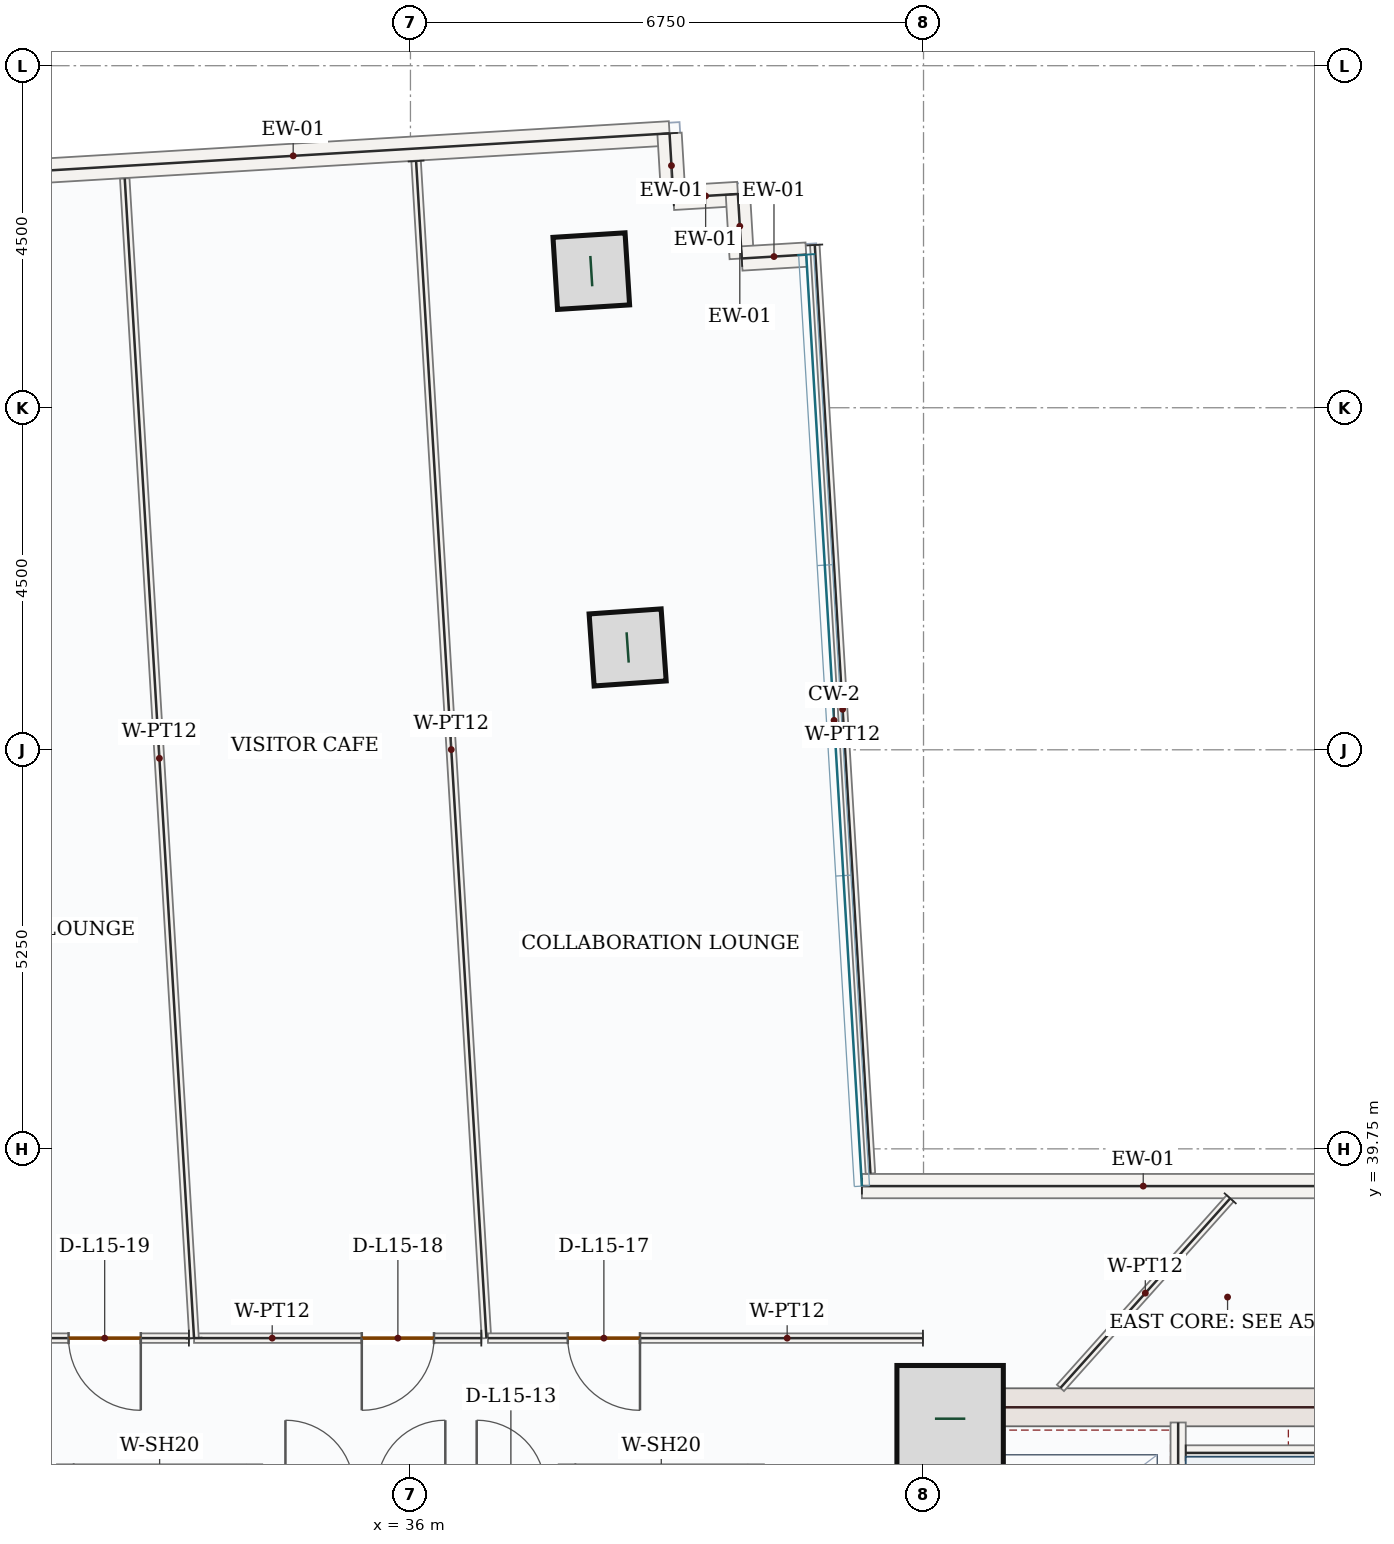
"""IFC4 building model, lengths in metres.
Left out: names, types, materials, properties, quantities, classifications, styles, units other than length and angle.
Written with IfcOpenShell. Run it as: python <this file> out.ifc"""

import sys

from ifc_helpers import new_model, si_unit, direction, frame, frame_2d, origin, origin_2d, place, context, subcontext, project, spatial, rectangle, hollow_rectangle, extrude, source, transform, mapped, element, fill, save


model = new_model("IFC4")
c1 = context("Model", 3, precision=1e-05, world=origin(), true_north=direction((0.0, 1.0)))
c2 = subcontext(c1, "Body", "Model", "MODEL_VIEW")
j1 = project(units=[si_unit("LENGTHUNIT", "METRE"), si_unit("PLANEANGLEUNIT", "RADIAN")], contexts=[c1])
p1 = place(None, origin())
s1 = spatial("IfcSite", under=j1, at=p1, CompositionType="ELEMENT")
p2 = place(p1, origin())
s2 = spatial("IfcBuilding", under=s1, at=p2, CompositionType="ELEMENT")
p3 = place(p2, frame((0.0, 0.0, 71.1)))
s3 = spatial("IfcBuildingStorey", under=s2, at=p3, CompositionType="ELEMENT", Elevation=71.1)
p4 = place(p3, frame((43.0, 28.05, 0.0), z_axis=(0.0, 0.0, 1.0), x_axis=(0.0, 1.0, 0.0)))
e1 = element("IfcWall", 1, at=p4, inside=s3, PredefinedType="SHEAR", context=c2, shape_type="SweptSolid", body=[
    extrude(rectangle(XDim=8.55, YDim=0.5, at=frame_2d((4.275, 0.0))), origin(), (0.0, 0.0, 1.0), 3.95),
])
p5 = place(p4, frame((1.5, 0.0, 0.0)))
e2 = element("IfcOpeningElement", 2, at=p5, cuts=e1, PredefinedType="OPENING", context=c2, shape_type="SweptSolid", body=[
    extrude(rectangle(XDim=1.1, YDim=2.2, at=frame_2d((0.55, 1.1))), frame((0.0, 0.26, 0.0), z_axis=(0.0, -1.0, 0.0), x_axis=(1.0, 0.0, 0.0)), (0.0, 0.0, 1.0), 0.52),
])
m1 = source(origin(), c2, "Body", "SweptSolid", [
    extrude(rectangle(XDim=7.0, YDim=0.5, at=frame_2d((3.5, 0.0))), origin(), (0.0, 0.0, 1.0), 3.95),
])
p6 = place(p3, frame((43.25, 36.35, 0.0), z_axis=(0.0, 0.0, 1.0), x_axis=(1.0, 0.0, 0.0)))
e3 = element("IfcWall", 3, at=p6, inside=s3, PredefinedType="SHEAR", context=c2, shape_type="MappedRepresentation", body=[
    mapped(m1, transform((0.0, 0.0, 0.0), x_axis=(1.0, 0.0, 0.0), y_axis=(0.0, 1.0, 0.0), z_axis=(0.0, 0.0, 1.0), scale=1.0)),
])
m2 = source(origin(), c2, "Body", "SweptSolid", [
    extrude(rectangle(XDim=1.4, YDim=1.4, at=origin_2d()), origin(), (0.0, 0.0, 1.0), 4.2),
])
p7 = place(p3, frame((43.1, 36.2, 0.0), z_axis=(0.0, 0.0, 1.0), x_axis=(1.0, 0.0, 0.0)))
e4 = element("IfcColumn", 4, at=p7, inside=s3, PredefinedType="COLUMN", context=c2, shape_type="MappedRepresentation", body=[
    mapped(m2, transform((0.0, 0.0, 0.0), x_axis=(1.0, 0.0, 0.0), y_axis=(0.0, 1.0, 0.0), z_axis=(0.0, 0.0, 1.0), scale=1.0)),
])
m3 = source(origin(), c2, "Body", "SweptSolid", [
    extrude(hollow_rectangle(XDim=0.95, YDim=0.95, WallThickness=0.05, at=origin_2d()), origin(), (0.0, 0.0, 1.0), 4.2),
])
for number, where, z_axis, x_axis in (
    (5, (38.857, 46.346, 0.0), (0.0, 0.0, 1.0), (-0.07, 0.998, 0.0)),
    (6, (38.379, 51.297, 0.0), (0.0, 0.0, 1.0), (-0.063, 0.998, 0.0)),
):
    element("IfcColumn", number, at=place(p3, frame(where, z_axis=z_axis, x_axis=x_axis)), inside=s3, PredefinedType="COLUMN", context=c2, shape_type="MappedRepresentation", body=[
        mapped(m3, transform((0.0, 0.0, 0.0), x_axis=(1.0, 0.0, 0.0), y_axis=(0.0, 1.0, 0.0), z_axis=(0.0, 0.0, 1.0), scale=1.0)),
    ])
m4 = source(origin(), c2, "Body", "SweptSolid", [
    extrude(rectangle(XDim=9.92, YDim=0.32, at=frame_2d((4.96, 0.0))), origin(), (0.0, 0.0, 1.0), 3.95),
])
p8 = place(p3, frame((29.506, 52.518, 0.0), z_axis=(0.0, 0.0, 1.0), x_axis=(0.998218942745, 0.059656871726, 0.0)))
e7 = element("IfcWall", 7, at=p8, inside=s3, PredefinedType="SOLIDWALL", context=c2, shape_type="MappedRepresentation", body=[
    mapped(m4, transform((0.0, 0.0, 0.0), x_axis=(1.0, 0.0, 0.0), y_axis=(0.0, 1.0, 0.0), z_axis=(0.0, 0.0, 1.0), scale=1.0)),
])
m5 = source(origin(), c2, "Body", "SweptSolid", [
    extrude(rectangle(XDim=0.85, YDim=0.32, at=frame_2d((0.425, 0.0))), origin(), (0.0, 0.0, 1.0), 3.95),
])
p9 = place(p3, frame((39.408, 53.11, 0.0), z_axis=(0.0, 0.0, 1.0), x_axis=(0.059732049764, -0.998214447016, 0.0)))
e8 = element("IfcWall", 8, at=p9, inside=s3, PredefinedType="SOLIDWALL", context=c2, shape_type="MappedRepresentation", body=[
    mapped(m5, transform((0.0, 0.0, 0.0), x_axis=(1.0, 0.0, 0.0), y_axis=(0.0, 1.0, 0.0), z_axis=(0.0, 0.0, 1.0), scale=1.0)),
])
m6 = source(origin(), c2, "Body", "SweptSolid", [
    extrude(rectangle(XDim=0.85, YDim=0.32, at=frame_2d((0.425, 0.0))), origin(), (0.0, 0.0, 1.0), 3.95),
])
for number, where, z_axis, x_axis in (
    (9, (39.459, 52.261, 0.0), (0.0, 0.0, 1.0), (0.998, 0.06, 0.0)),
    (10, (40.308, 52.312, 0.0), (0.0, 0.0, 1.0), (0.06, -0.998, 0.0)),
    (11, (40.358, 51.464, 0.0), (0.0, 0.0, 1.0), (0.998, 0.06, 0.0)),
):
    element("IfcWall", number, at=place(p3, frame(where, z_axis=z_axis, x_axis=x_axis)), inside=s3, PredefinedType="SOLIDWALL", context=c2, shape_type="MappedRepresentation", body=[
        mapped(m6, transform((0.0, 0.0, 0.0), x_axis=(1.0, 0.0, 0.0), y_axis=(0.0, 1.0, 0.0), z_axis=(0.0, 0.0, 1.0), scale=1.0)),
    ])
m7 = source(origin(), c2, "Body", "SweptSolid", [
    extrude(rectangle(XDim=7.403, YDim=0.32, at=frame_2d((3.701, 0.0))), origin(), (0.0, 0.0, 1.0), 3.95),
])
p10 = place(p3, frame((41.939, 39.26, 0.0), z_axis=(0.0, 0.0, 1.0), x_axis=(1.0, 0.0, 0.0)))
e12 = element("IfcWall", 12, at=p10, inside=s3, PredefinedType="SOLIDWALL", context=c2, shape_type="MappedRepresentation", body=[
    mapped(m7, transform((0.0, 0.0, 0.0), x_axis=(1.0, 0.0, 0.0), y_axis=(0.0, 1.0, 0.0), z_axis=(0.0, 0.0, 1.0), scale=1.0)),
])
p11 = place(p3, frame((46.1, 28.15, 0.0), z_axis=(0.0, 0.0, 1.0), x_axis=(0.0, 1.0, 0.0)))
e13 = element("IfcWall", 13, at=p11, inside=s3, PredefinedType="SOLIDWALL", context=c2, shape_type="SweptSolid", body=[
    extrude(rectangle(XDim=8.0, YDim=0.2, at=frame_2d((4.0, 0.0))), origin(), (0.0, 0.0, 1.0), 3.95),
])
p12 = place(p11, frame((0.4, 0.0, 0.0)))
e14 = element("IfcOpeningElement", 14, at=p12, cuts=e13, PredefinedType="OPENING", context=c2, shape_type="SweptSolid", body=[
    extrude(rectangle(XDim=1.05, YDim=2.15, at=frame_2d((0.525, 1.075))), frame((0.0, 0.11, 0.0), z_axis=(0.0, -1.0, 0.0), x_axis=(1.0, 0.0, 0.0)), (0.0, 0.0, 1.0), 0.22),
])
m8 = source(origin(), c2, "Body", "SweptSolid", [
    extrude(rectangle(XDim=3.25, YDim=0.2, at=frame_2d((1.625, 0.0))), origin(), (0.0, 0.0, 1.0), 3.95),
])
p13 = place(p3, frame((46.2, 35.75, 0.0), z_axis=(0.0, 0.0, 1.0), x_axis=(1.0, 0.0, 0.0)))
e15 = element("IfcWall", 15, at=p13, inside=s3, PredefinedType="SOLIDWALL", context=c2, shape_type="MappedRepresentation", body=[
    mapped(m8, transform((0.0, 0.0, 0.0), x_axis=(1.0, 0.0, 0.0), y_axis=(0.0, 1.0, 0.0), z_axis=(0.0, 0.0, 1.0), scale=1.0)),
])
m9 = source(origin(), c2, "Body", "SweptSolid", [
    extrude(rectangle(XDim=2.4, YDim=0.2, at=frame_2d((1.2, 0.0))), origin(), (0.0, 0.0, 1.0), 3.95),
])
for number, where, z_axis, x_axis in (
    (16, (31.45, 33.2, 0.0), (0.0, 0.0, 1.0), (0.0, 1.0, 0.0)),
    (17, (33.95, 33.2, 0.0), (0.0, 0.0, 1.0), (0.0, 1.0, 0.0)),
    (18, (38.05, 33.2, 0.0), (0.0, 0.0, 1.0), (0.0, 1.0, 0.0)),
    (19, (40.55, 33.2, 0.0), (0.0, 0.0, 1.0), (0.0, 1.0, 0.0)),
):
    element("IfcWall", number, at=place(p3, frame(where, z_axis=z_axis, x_axis=x_axis)), inside=s3, PredefinedType="SOLIDWALL", context=c2, shape_type="MappedRepresentation", body=[
        mapped(m9, transform((0.0, 0.0, 0.0), x_axis=(1.0, 0.0, 0.0), y_axis=(0.0, 1.0, 0.0), z_axis=(0.0, 0.0, 1.0), scale=1.0)),
    ])
m10 = source(origin(), c2, "Body", "SweptSolid", [
    extrude(rectangle(XDim=15.513, YDim=0.125, at=frame_2d((7.756, 0.0))), origin(), (0.0, 0.0, 1.0), 3.95),
])
p14 = place(p3, frame((36.074, 52.745, 0.0), z_axis=(0.0, 0.0, 1.0), x_axis=(0.059662086624, -0.998218631072, 0.0)))
e20 = element("IfcWall", 20, at=p14, inside=s3, PredefinedType="PARTITIONING", context=c2, shape_type="MappedRepresentation", body=[
    mapped(m10, transform((0.0, 0.0, 0.0), x_axis=(1.0, 0.0, 0.0), y_axis=(0.0, 1.0, 0.0), z_axis=(0.0, 0.0, 1.0), scale=1.0)),
])
p15 = place(p3, frame((36.932, 37.26, 0.0), z_axis=(0.0, 0.0, 1.0), x_axis=(-1.0, 0.0, 0.0)))
e21 = element("IfcWall", 21, at=p15, inside=s3, PredefinedType="PARTITIONING", context=c2, shape_type="SweptSolid", body=[
    extrude(rectangle(XDim=3.779, YDim=0.125, at=frame_2d((1.89, 0.0))), origin(), (0.0, 0.0, 1.0), 3.95),
])
p16 = place(p15, frame((0.622, 0.0, 0.0)))
e22 = element("IfcOpeningElement", 22, at=p16, cuts=e21, PredefinedType="OPENING", context=c2, shape_type="SweptSolid", body=[
    extrude(rectangle(XDim=0.95, YDim=2.15, at=frame_2d((0.475, 1.075))), frame((0.0, 0.073, 0.0), z_axis=(0.0, -1.0, 0.0), x_axis=(1.0, 0.0, 0.0)), (0.0, 0.0, 1.0), 0.145),
])
m11 = source(origin(), c2, "Body", "SweptSolid", [
    extrude(rectangle(XDim=15.283, YDim=0.125, at=frame_2d((7.642, 0.0))), origin(), (0.0, 0.0, 1.0), 3.95),
])
p17 = place(p3, frame((33.153, 37.26, 0.0), z_axis=(0.0, 0.0, 1.0), x_axis=(-0.059648121824, 0.99821946563, 0.0)))
e23 = element("IfcWall", 23, at=p17, inside=s3, PredefinedType="PARTITIONING", context=c2, shape_type="MappedRepresentation", body=[
    mapped(m11, transform((0.0, 0.0, 0.0), x_axis=(1.0, 0.0, 0.0), y_axis=(0.0, 1.0, 0.0), z_axis=(0.0, 0.0, 1.0), scale=1.0)),
])
p18 = place(p3, frame((33.085, 37.26, 0.0), z_axis=(0.0, 0.0, 1.0), x_axis=(-0.999999997966, -6.3783646e-05, 0.0)))
e24 = element("IfcWall", 24, at=p18, inside=s3, PredefinedType="PARTITIONING", context=c2, shape_type="SweptSolid", body=[
    extrude(rectangle(XDim=3.828, YDim=0.125, at=frame_2d((1.914, 0.0))), origin(), (0.0, 0.0, 1.0), 3.95),
])
p19 = place(p18, frame((0.633, 0.0, 0.0)))
e25 = element("IfcOpeningElement", 25, at=p19, cuts=e24, PredefinedType="OPENING", context=c2, shape_type="SweptSolid", body=[
    extrude(rectangle(XDim=0.95, YDim=2.15, at=frame_2d((0.475, 1.075))), frame((0.0, 0.073, 0.0), z_axis=(0.0, -1.0, 0.0), x_axis=(1.0, 0.0, 0.0)), (0.0, 0.0, 1.0), 0.145),
])
p20 = place(p3, frame((42.742, 37.26, 0.0), z_axis=(0.0, 0.0, 1.0), x_axis=(-0.99999999909, 4.2662116e-05, 0.0)))
e26 = element("IfcWall", 26, at=p20, inside=s3, PredefinedType="PARTITIONING", context=c2, shape_type="SweptSolid", body=[
    extrude(rectangle(XDim=5.723, YDim=0.125, at=frame_2d((2.861, 0.0))), origin(), (0.0, 0.0, 1.0), 3.95),
])
p21 = place(p20, frame((3.723, 0.0, 0.0)))
e27 = element("IfcOpeningElement", 27, at=p21, cuts=e26, PredefinedType="OPENING", context=c2, shape_type="SweptSolid", body=[
    extrude(rectangle(XDim=0.95, YDim=2.15, at=frame_2d((0.475, 1.075))), frame((0.0, 0.073, 0.0), z_axis=(0.0, -1.0, 0.0), x_axis=(1.0, 0.0, 0.0)), (0.0, 0.0, 1.0), 0.145),
])
m12 = source(origin(), c2, "Body", "SweptSolid", [
    extrude(rectangle(XDim=12.238, YDim=0.125, at=frame_2d((6.119, 0.0))), origin(), (0.0, 0.0, 1.0), 3.95),
])
p22 = place(p3, frame((41.32, 51.641, 0.0), z_axis=(0.0, 0.0, 1.0), x_axis=(0.059807214901, -0.998209946377, 0.0)))
e28 = element("IfcWall", 28, at=p22, inside=s3, PredefinedType="PARTITIONING", context=c2, shape_type="MappedRepresentation", body=[
    mapped(m12, transform((0.0, 0.0, 0.0), x_axis=(1.0, 0.0, 0.0), y_axis=(0.0, 1.0, 0.0), z_axis=(0.0, 0.0, 1.0), scale=1.0)),
])
m13 = source(origin(), c2, "Body", "SweptSolid", [
    extrude(rectangle(XDim=3.348, YDim=0.125, at=frame_2d((1.674, 0.0))), origin(), (0.0, 0.0, 1.0), 3.95),
])
p23 = place(p3, frame((46.785, 39.099, 0.0), z_axis=(0.0, 0.0, 1.0), x_axis=(-0.667206176518, -0.74487308853, 0.0)))
e29 = element("IfcWall", 29, at=p23, inside=s3, PredefinedType="PARTITIONING", context=c2, shape_type="MappedRepresentation", body=[
    mapped(m13, transform((0.0, 0.0, 0.0), x_axis=(1.0, 0.0, 0.0), y_axis=(0.0, 1.0, 0.0), z_axis=(0.0, 0.0, 1.0), scale=1.0)),
])
m14 = source(origin(), c2, "Body", "SweptSolid", [
    extrude(rectangle(XDim=0.95, YDim=2.15, at=frame_2d((0.475, 1.075))), frame((0.0, 0.025, 0.0), z_axis=(0.0, -1.0, 0.0), x_axis=(1.0, 0.0, 0.0)), (0.0, 0.0, 1.0), 0.05),
])
p24 = place(p21, origin())
e30 = element("IfcDoor", 30, at=p24, inside=s3, OperationType="SINGLE_SWING_LEFT", PredefinedType="DOOR", context=c2, shape_type="MappedRepresentation", body=[
    mapped(m14, transform((0.0, 0.0, 0.0), x_axis=(1.0, 0.0, 0.0), y_axis=(0.0, 1.0, 0.0), z_axis=(0.0, 0.0, 1.0), scale=1.0)),
])
fill(e27, e30)
p25 = place(p16, origin())
e31 = element("IfcDoor", 31, at=p25, inside=s3, OperationType="SINGLE_SWING_RIGHT", PredefinedType="DOOR", context=c2, shape_type="MappedRepresentation", body=[
    mapped(m14, transform((0.0, 0.0, 0.0), x_axis=(1.0, 0.0, 0.0), y_axis=(0.0, 1.0, 0.0), z_axis=(0.0, 0.0, 1.0), scale=1.0)),
])
fill(e22, e31)
p26 = place(p19, origin())
e32 = element("IfcDoor", 32, at=p26, inside=s3, OperationType="SINGLE_SWING_LEFT", PredefinedType="DOOR", context=c2, shape_type="MappedRepresentation", body=[
    mapped(m14, transform((0.0, 0.0, 0.0), x_axis=(1.0, 0.0, 0.0), y_axis=(0.0, 1.0, 0.0), z_axis=(0.0, 0.0, 1.0), scale=1.0)),
])
fill(e25, e32)
save(model, sys.argv[1])
